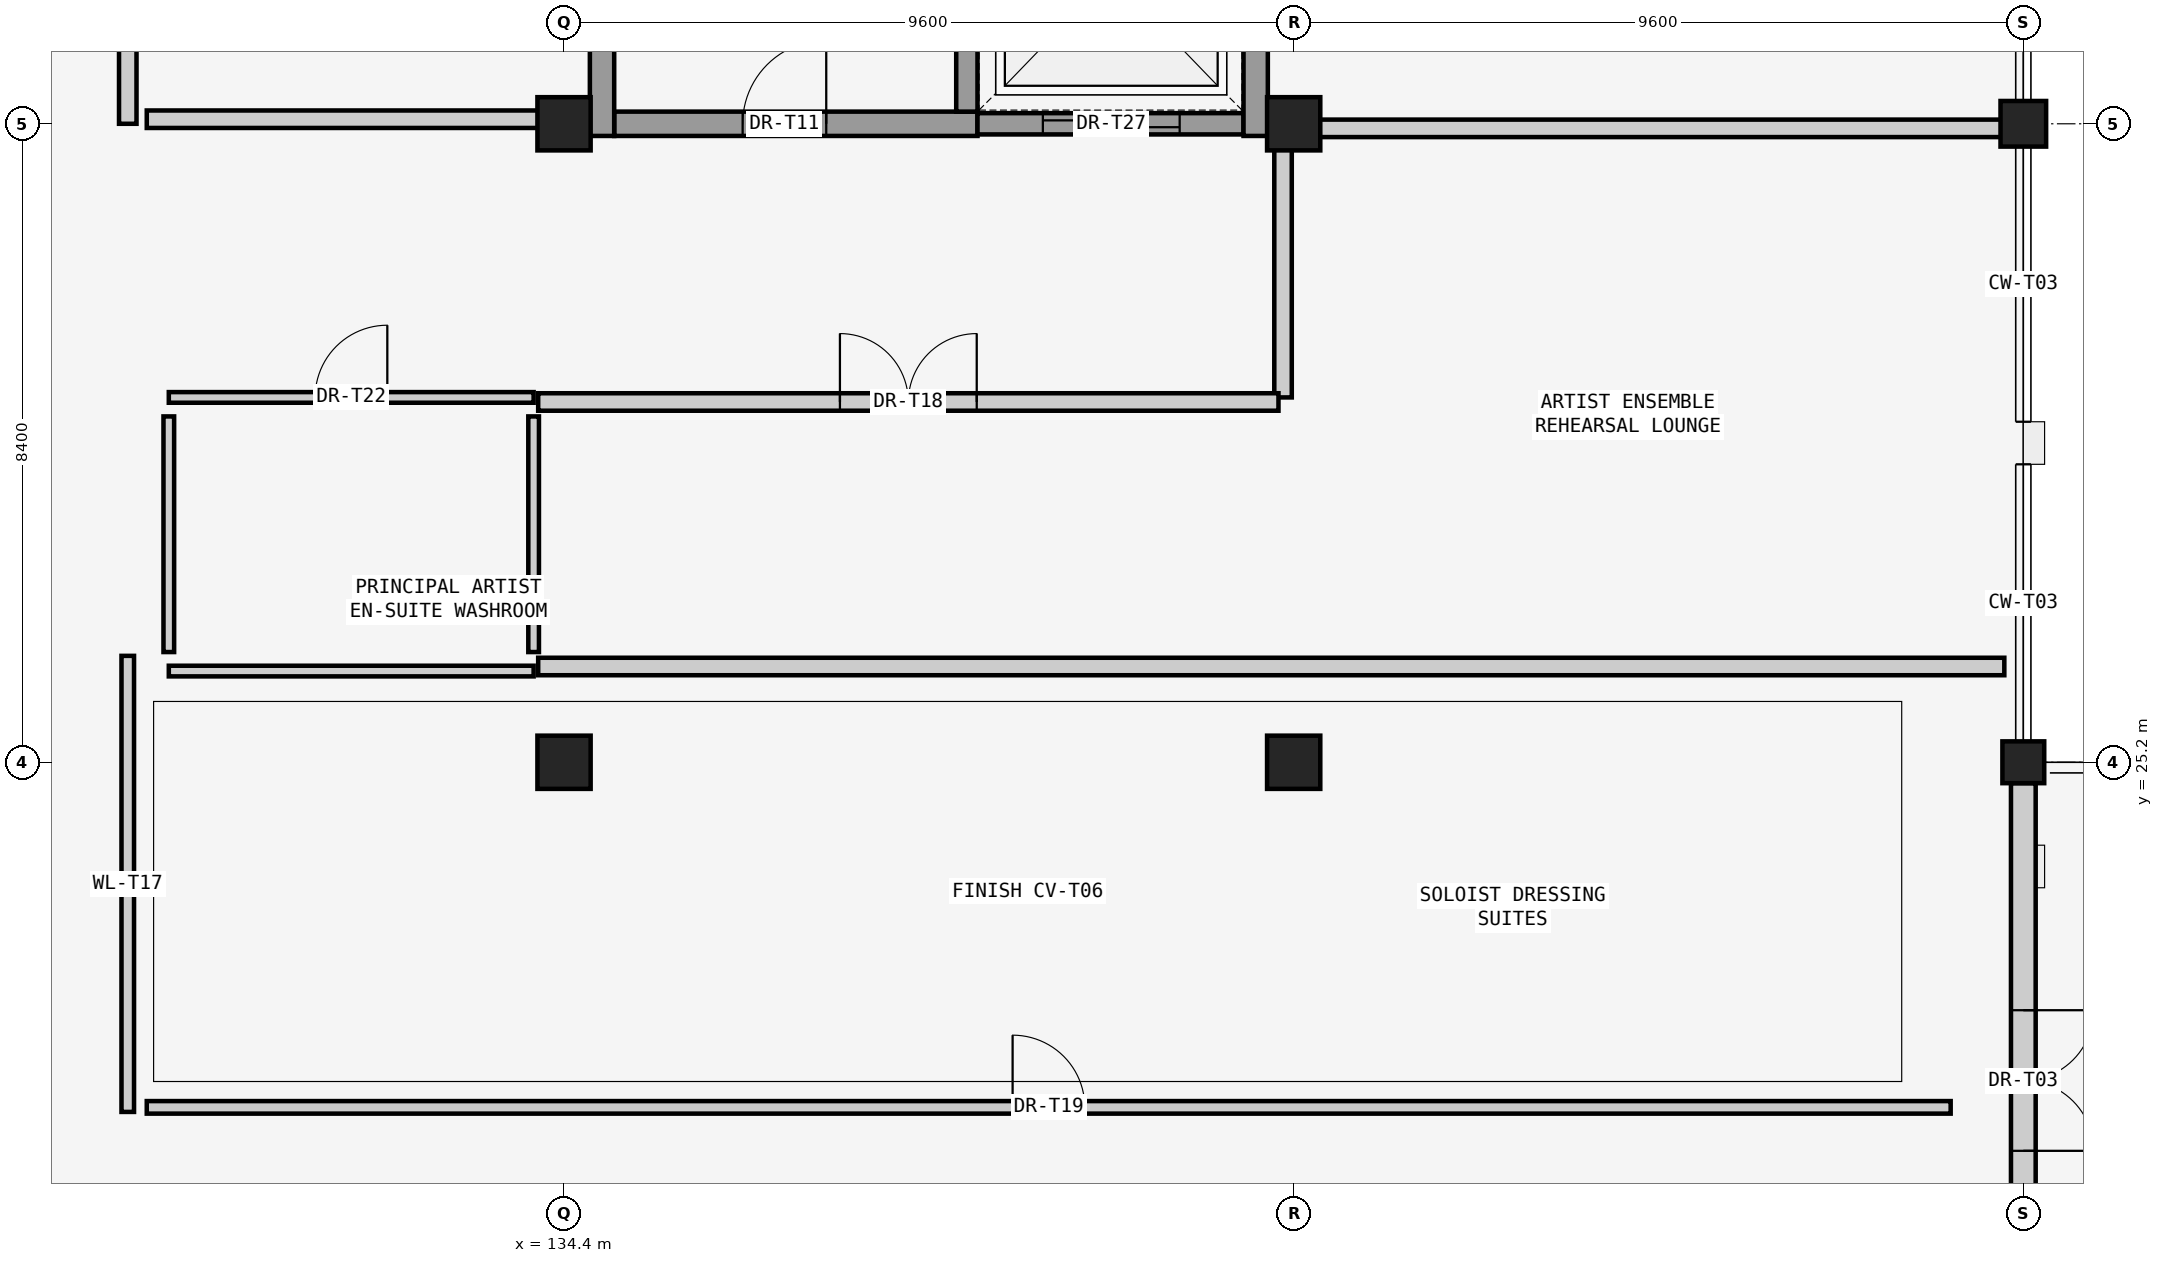
"""IFC4 building model, lengths in metres.
Left out: names, types, materials, properties, quantities, classifications, styles, units other than length and angle.
Written with IfcOpenShell. Run it as: python <this file> out.ifc"""

import sys

from ifc_helpers import new_model, si_unit, direction, frame, frame_2d, origin, origin_2d, place, context, subcontext, project, spatial, rectangle, extrude, element, fill, save


model = new_model("IFC4")
c1 = context("Model", 3, precision=1e-05, world=origin(), true_north=direction((0.0, 1.0)))
c2 = subcontext(c1, "Body", "Model", "MODEL_VIEW")
j1 = project(units=[si_unit("LENGTHUNIT", "METRE"), si_unit("PLANEANGLEUNIT", "RADIAN")], contexts=[c1])
p1 = place(None, origin())
s1 = spatial("IfcSite", under=j1, at=p1, CompositionType="ELEMENT")
p2 = place(p1, origin())
s2 = spatial("IfcBuilding", under=s1, at=p2, CompositionType="ELEMENT")
p3 = place(p2, frame((0.0, 0.0, 5.4)))
s3 = spatial("IfcBuildingStorey", under=s2, at=p3, CompositionType="ELEMENT", Elevation=5.4)
for number, where, z_axis, x_axis in (
    (1, (134.4, 25.2, 0.0), (0.0, 0.0, 1.0), (1.0, 0.0, 0.0)),
    (2, (134.4, 33.6, 0.0), (0.0, 0.0, 1.0), (1.0, 0.0, 0.0)),
):
    element("IfcColumn", number, at=place(p3, frame(where, z_axis=z_axis, x_axis=x_axis)), inside=s3, PredefinedType="COLUMN", context=c2, shape_type="SweptSolid", body=[
        extrude(rectangle(XDim=0.7, YDim=0.7, at=origin_2d()), origin(), (0.0, 0.0, 1.0), 4.54),
    ])
p4 = place(p3, frame((144.0, 25.2, 0.0), z_axis=(0.0, 0.0, 1.0), x_axis=(1.0, 0.0, 0.0)))
e3 = element("IfcColumn", 3, at=p4, inside=s3, PredefinedType="COLUMN", context=c2, shape_type="SweptSolid", body=[
    extrude(rectangle(XDim=0.7, YDim=0.7, at=origin_2d()), origin(), (0.0, 0.0, 1.0), 4.53),
])
p5 = place(p3, frame((144.0, 33.6, 0.0), z_axis=(0.0, 0.0, 1.0), x_axis=(1.0, 0.0, 0.0)))
e4 = element("IfcColumn", 4, at=p5, inside=s3, PredefinedType="COLUMN", context=c2, shape_type="SweptSolid", body=[
    extrude(rectangle(XDim=0.7, YDim=0.7, at=origin_2d()), origin(), (0.0, 0.0, 1.0), 4.54),
])
p6 = place(p3, frame((153.6, 25.2, 0.0), z_axis=(0.0, 0.0, 1.0), x_axis=(1.0, 0.0, 0.0)))
e5 = element("IfcColumn", 5, at=p6, inside=s3, PredefinedType="COLUMN", context=c2, shape_type="SweptSolid", body=[
    extrude(rectangle(XDim=0.55, YDim=0.55, at=origin_2d()), origin(), (0.0, 0.0, 1.0), 4.53),
])
p7 = place(p3, frame((153.6, 33.6, 0.0), z_axis=(0.0, 0.0, 1.0), x_axis=(1.0, 0.0, 0.0)))
e6 = element("IfcColumn", 6, at=p7, inside=s3, PredefinedType="COLUMN", context=c2, shape_type="SweptSolid", body=[
    extrude(rectangle(XDim=0.6, YDim=0.6, at=origin_2d()), origin(), (0.0, 0.0, 1.0), 4.57),
])
p8 = place(p3, frame((153.6, 24.925, 0.0), z_axis=(0.0, 0.0, 1.0), x_axis=(0.0, -1.0, 0.0)))
e7 = element("IfcWall", 7, at=p8, inside=s3, PredefinedType="SOLIDWALL", context=c2, shape_type="SweptSolid", body=[
    extrude(rectangle(XDim=7.825, YDim=0.325, at=frame_2d((3.913, 0.0))), origin(), (0.0, 0.0, 1.0), 3.91),
])
p9 = place(p8, frame((2.987, 0.0, 0.0)))
e8 = element("IfcOpeningElement", 8, at=p9, cuts=e7, PredefinedType="OPENING", context=c2, shape_type="SweptSolid", body=[
    extrude(rectangle(XDim=1.85, YDim=2.3, at=frame_2d((0.925, 1.15))), frame((0.0, 0.172, 0.0), z_axis=(0.0, -1.0, 0.0), x_axis=(1.0, 0.0, 0.0)), (0.0, 0.0, 1.0), 0.345),
])
p10 = place(p3, frame((135.06, 33.6, 0.0), z_axis=(0.0, 0.0, 1.0), x_axis=(1.0, 0.0, 0.0)))
e9 = element("IfcWall", 9, at=p10, inside=s3, PredefinedType="SHEAR", context=c2, shape_type="SweptSolid", body=[
    extrude(rectangle(XDim=4.78, YDim=0.32, at=frame_2d((2.39, 0.0))), origin(), (0.0, 0.0, 1.0), 4.52),
])
p11 = place(p10, frame((1.69, 0.0, 0.0)))
e10 = element("IfcOpeningElement", 10, at=p11, cuts=e9, PredefinedType="OPENING", context=c2, shape_type="SweptSolid", body=[
    extrude(rectangle(XDim=1.1, YDim=2.2, at=frame_2d((0.55, 1.1))), frame((0.0, 0.17, 0.0), z_axis=(0.0, -1.0, 0.0), x_axis=(1.0, 0.0, 0.0)), (0.0, 0.0, 1.0), 0.34),
])
p12 = place(p3, frame((139.84, 33.6, 0.0), z_axis=(0.0, 0.0, 1.0), x_axis=(1.0, 0.0, 0.0)))
e11 = element("IfcWall", 11, at=p12, inside=s3, PredefinedType="SHEAR", context=c2, shape_type="SweptSolid", body=[
    extrude(rectangle(XDim=3.5, YDim=0.28, at=frame_2d((1.75, 0.0))), origin(), (0.0, 0.0, 1.0), 4.52),
])
p13 = place(p12, frame((0.86, 0.0, 0.0)))
e12 = element("IfcOpeningElement", 12, at=p13, cuts=e11, PredefinedType="OPENING", context=c2, shape_type="SweptSolid", body=[
    extrude(rectangle(XDim=1.8, YDim=2.4, at=frame_2d((0.9, 1.2))), frame((0.0, 0.15, 0.0), z_axis=(0.0, -1.0, 0.0), x_axis=(1.0, 0.0, 0.0)), (0.0, 0.0, 1.0), 0.3),
])
for number, where, z_axis, x_axis in (
    (13, (134.9, 41.8, 0.0), (0.0, 0.0, 1.0), (0.0, -1.0, 0.0)),
    (14, (143.5, 33.44, 0.0), (0.0, 0.0, 1.0), (0.0, 1.0, 0.0)),
):
    element("IfcWall", number, at=place(p3, frame(where, z_axis=z_axis, x_axis=x_axis)), inside=s3, PredefinedType="SHEAR", context=c2, shape_type="SweptSolid", body=[
        extrude(rectangle(XDim=8.36, YDim=0.32, at=frame_2d((4.18, 0.0))), origin(), (0.0, 0.0, 1.0), 4.52),
    ])
p14 = place(p3, frame((139.7, 33.76, 0.0), z_axis=(0.0, 0.0, 1.0), x_axis=(0.0, 1.0, 0.0)))
e15 = element("IfcWall", 15, at=p14, inside=s3, PredefinedType="SHEAR", context=c2, shape_type="SweptSolid", body=[
    extrude(rectangle(XDim=7.72, YDim=0.28, at=frame_2d((3.86, 0.0))), origin(), (0.0, 0.0, 1.0), 4.52),
])
p15 = place(p3, frame((129.2, 26.4, 0.0), z_axis=(0.0, 0.0, 1.0), x_axis=(1.0, 0.0, 0.0)))
e16 = element("IfcWall", 16, at=p15, inside=s3, PredefinedType="PARTITIONING", context=c2, shape_type="SweptSolid", body=[
    extrude(rectangle(XDim=4.8, YDim=0.14, at=frame_2d((2.4, 0.0))), origin(), (0.0, 0.0, 1.0), 4.32),
])
p16 = place(p3, frame((129.2, 30.0, 0.0), z_axis=(0.0, 0.0, 1.0), x_axis=(1.0, 0.0, 0.0)))
e17 = element("IfcWall", 17, at=p16, inside=s3, PredefinedType="PARTITIONING", context=c2, shape_type="SweptSolid", body=[
    extrude(rectangle(XDim=4.8, YDim=0.14, at=frame_2d((2.4, 0.0))), origin(), (0.0, 0.0, 1.0), 4.32),
])
p17 = place(p16, frame((1.925, 0.0, 0.0)))
e18 = element("IfcOpeningElement", 18, at=p17, cuts=e17, PredefinedType="OPENING", context=c2, shape_type="SweptSolid", body=[
    extrude(rectangle(XDim=0.95, YDim=2.15, at=frame_2d((0.475, 1.075))), frame((0.0, 0.08, 0.0), z_axis=(0.0, -1.0, 0.0), x_axis=(1.0, 0.0, 0.0)), (0.0, 0.0, 1.0), 0.16),
])
for number, where, z_axis, x_axis in (
    (19, (129.2, 26.65, 0.0), (0.0, 0.0, 1.0), (0.0, 1.0, 0.0)),
    (20, (134.0, 26.65, 0.0), (0.0, 0.0, 1.0), (0.0, 1.0, 0.0)),
):
    element("IfcWall", number, at=place(p3, frame(where, z_axis=z_axis, x_axis=x_axis)), inside=s3, PredefinedType="PARTITIONING", context=c2, shape_type="SweptSolid", body=[
        extrude(rectangle(XDim=3.1, YDim=0.14, at=frame_2d((1.55, 0.0))), origin(), (0.0, 0.0, 1.0), 4.32),
    ])
p18 = place(p3, frame((128.66, 20.6, 0.0), z_axis=(0.0, 0.0, 1.0), x_axis=(0.0, 1.0, 0.0)))
e21 = element("IfcWall", 21, at=p18, inside=s3, PredefinedType="PARTITIONING", context=c2, shape_type="SweptSolid", body=[
    extrude(rectangle(XDim=6.0, YDim=0.165, at=frame_2d((3.0, 0.0))), origin(), (0.0, 0.0, 1.0), 4.48),
])
p19 = place(p3, frame((128.91, 20.66, 0.0), z_axis=(0.0, 0.0, 1.0), x_axis=(1.0, 0.0, 0.0)))
e22 = element("IfcWall", 22, at=p19, inside=s3, PredefinedType="PARTITIONING", context=c2, shape_type="SweptSolid", body=[
    extrude(rectangle(XDim=23.734, YDim=0.165, at=frame_2d((11.867, 0.0))), origin(), (0.0, 0.0, 1.0), 4.48),
])
p20 = place(p19, frame((11.392, 0.0, 0.0)))
e23 = element("IfcOpeningElement", 23, at=p20, cuts=e22, PredefinedType="OPENING", context=c2, shape_type="SweptSolid", body=[
    extrude(rectangle(XDim=0.95, YDim=2.15, at=frame_2d((0.475, 1.075))), frame((0.0, 0.093, 0.0), z_axis=(0.0, -1.0, 0.0), x_axis=(1.0, 0.0, 0.0)), (0.0, 0.0, 1.0), 0.185),
])
p21 = place(p3, frame((128.66, 33.6, 0.0), z_axis=(0.0, 0.0, 1.0), x_axis=(0.0, 1.0, 0.0)))
e24 = element("IfcWall", 24, at=p21, inside=s3, PredefinedType="SOLIDWALL", context=c2, shape_type="SweptSolid", body=[
    extrude(rectangle(XDim=18.09, YDim=0.23, at=frame_2d((9.045, 0.0))), origin(), (0.0, 0.0, 1.0), 4.48),
])
p22 = place(p21, frame((8.145, 0.0, 0.0)))
e25 = element("IfcOpeningElement", 25, at=p22, cuts=e24, PredefinedType="OPENING", context=c2, shape_type="SweptSolid", body=[
    extrude(rectangle(XDim=1.8, YDim=2.4, at=frame_2d((0.9, 1.2))), frame((0.0, 0.125, 0.0), z_axis=(0.0, -1.0, 0.0), x_axis=(1.0, 0.0, 0.0)), (0.0, 0.0, 1.0), 0.25),
])
p23 = place(p3, frame((128.91, 33.66, 0.0), z_axis=(0.0, 0.0, 1.0), x_axis=(1.0, 0.0, 0.0)))
e26 = element("IfcWall", 26, at=p23, inside=s3, PredefinedType="SOLIDWALL", context=c2, shape_type="SweptSolid", body=[
    extrude(rectangle(XDim=5.74, YDim=0.23, at=frame_2d((2.87, 0.0))), origin(), (0.0, 0.0, 1.0), 3.67),
])
p24 = place(p3, frame((143.86, 30.0, 0.0), z_axis=(0.0, 0.0, 1.0), x_axis=(0.0, 1.0, 0.0)))
e27 = element("IfcWall", 27, at=p24, inside=s3, PredefinedType="SOLIDWALL", context=c2, shape_type="SweptSolid", body=[
    extrude(rectangle(XDim=3.6, YDim=0.23, at=frame_2d((1.8, 0.0))), origin(), (0.0, 0.0, 1.0), 3.81),
])
p25 = place(p3, frame((134.06, 29.94, 0.0), z_axis=(0.0, 0.0, 1.0), x_axis=(1.0, 0.0, 0.0)))
e28 = element("IfcWall", 28, at=p25, inside=s3, PredefinedType="SOLIDWALL", context=c2, shape_type="SweptSolid", body=[
    extrude(rectangle(XDim=9.74, YDim=0.23, at=frame_2d((4.87, 0.0))), origin(), (0.0, 0.0, 1.0), 4.48),
])
p26 = place(p25, frame((3.97, 0.0, 0.0)))
e29 = element("IfcOpeningElement", 29, at=p26, cuts=e28, PredefinedType="OPENING", context=c2, shape_type="SweptSolid", body=[
    extrude(rectangle(XDim=1.8, YDim=2.4, at=frame_2d((0.9, 1.2))), frame((0.0, 0.125, 0.0), z_axis=(0.0, -1.0, 0.0), x_axis=(1.0, 0.0, 0.0)), (0.0, 0.0, 1.0), 0.25),
])
p27 = place(p3, frame((134.06, 26.46, 0.0), z_axis=(0.0, 0.0, 1.0), x_axis=(1.0, 0.0, 0.0)))
e30 = element("IfcWall", 30, at=p27, inside=s3, PredefinedType="SOLIDWALL", context=c2, shape_type="SweptSolid", body=[
    extrude(rectangle(XDim=19.29, YDim=0.23, at=frame_2d((9.645, 0.0))), origin(), (0.0, 0.0, 1.0), 4.48),
])
p28 = place(p3, frame((144.11, 33.54, 0.0), z_axis=(0.0, 0.0, 1.0), x_axis=(1.0, 0.0, 0.0)))
e31 = element("IfcWall", 31, at=p28, inside=s3, PredefinedType="SOLIDWALL", context=c2, shape_type="SweptSolid", body=[
    extrude(rectangle(XDim=9.27, YDim=0.23, at=frame_2d((4.635, 0.0))), origin(), (0.0, 0.0, 1.0), 3.67),
])
p29 = place(p9, origin())
e32 = element("IfcDoor", 32, at=p29, inside=s3, OperationType="DOUBLE_DOOR_SINGLE_SWING", PredefinedType="DOOR", context=c2, shape_type="SweptSolid", body=[
    extrude(rectangle(XDim=1.85, YDim=2.3, at=frame_2d((0.925, 1.15))), frame((0.0, 0.025, 0.0), z_axis=(0.0, -1.0, 0.0), x_axis=(1.0, 0.0, 0.0)), (0.0, 0.0, 1.0), 0.05),
])
fill(e8, e32)
p30 = place(p11, origin())
e33 = element("IfcDoor", 33, at=p30, inside=s3, OperationType="SINGLE_SWING_RIGHT", PredefinedType="DOOR", context=c2, shape_type="SweptSolid", body=[
    extrude(rectangle(XDim=1.1, YDim=2.2, at=frame_2d((0.55, 1.1))), frame((0.0, 0.025, 0.0), z_axis=(0.0, -1.0, 0.0), x_axis=(1.0, 0.0, 0.0)), (0.0, 0.0, 1.0), 0.05),
])
fill(e10, e33)
p31 = place(p13, origin())
e34 = element("IfcDoor", 34, at=p31, inside=s3, OperationType="SLIDING_TO_LEFT", PredefinedType="DOOR", context=c2, shape_type="SweptSolid", body=[
    extrude(rectangle(XDim=1.8, YDim=2.4, at=frame_2d((0.9, 1.2))), frame((0.0, 0.025, 0.0), z_axis=(0.0, -1.0, 0.0), x_axis=(1.0, 0.0, 0.0)), (0.0, 0.0, 1.0), 0.05),
])
fill(e12, e34)
p32 = place(p17, origin())
e35 = element("IfcDoor", 35, at=p32, inside=s3, OperationType="SINGLE_SWING_RIGHT", PredefinedType="DOOR", context=c2, shape_type="SweptSolid", body=[
    extrude(rectangle(XDim=0.95, YDim=2.15, at=frame_2d((0.475, 1.075))), frame((0.0, 0.025, 0.0), z_axis=(0.0, -1.0, 0.0), x_axis=(1.0, 0.0, 0.0)), (0.0, 0.0, 1.0), 0.05),
])
fill(e18, e35)
p33 = place(p20, origin())
e36 = element("IfcDoor", 36, at=p33, inside=s3, OperationType="SINGLE_SWING_LEFT", PredefinedType="DOOR", context=c2, shape_type="SweptSolid", body=[
    extrude(rectangle(XDim=0.95, YDim=2.15, at=frame_2d((0.475, 1.075))), frame((0.0, 0.025, 0.0), z_axis=(0.0, -1.0, 0.0), x_axis=(1.0, 0.0, 0.0)), (0.0, 0.0, 1.0), 0.05),
])
fill(e23, e36)
p34 = place(p26, origin())
e37 = element("IfcDoor", 37, at=p34, inside=s3, OperationType="DOUBLE_SWING_LEFT", PredefinedType="DOOR", context=c2, shape_type="SweptSolid", body=[
    extrude(rectangle(XDim=1.8, YDim=2.4, at=frame_2d((0.9, 1.2))), frame((0.0, 0.025, 0.0), z_axis=(0.0, -1.0, 0.0), x_axis=(1.0, 0.0, 0.0)), (0.0, 0.0, 1.0), 0.05),
])
fill(e29, e37)
save(model, sys.argv[1])
